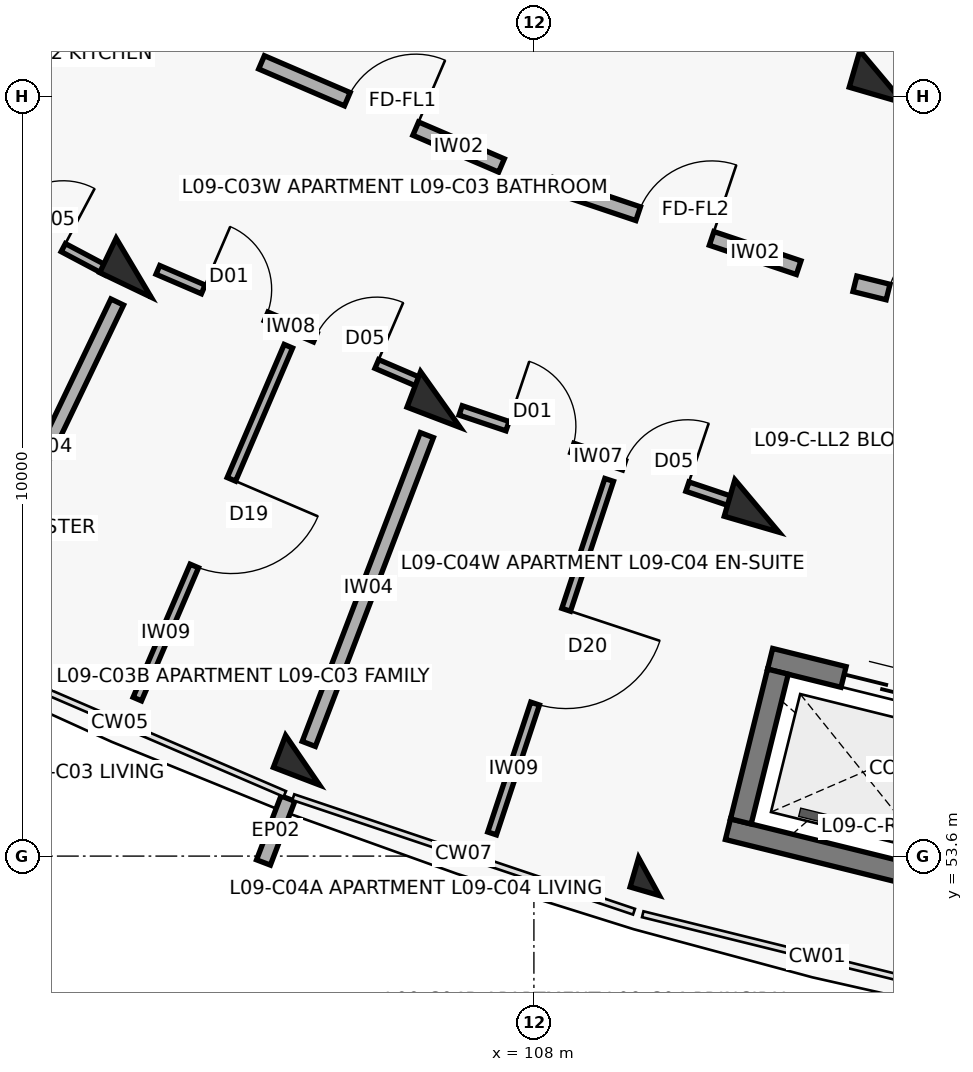
"""IFC4 building model, lengths in metres.
Left out: names, types, materials, properties, quantities, classifications, styles, units other than length and angle.
Written with IfcOpenShell. Run it as: python <this file> out.ifc"""

import sys

from ifc_helpers import new_model, si_unit, direction, frame, frame_2d, origin, origin_2d, place, context, subcontext, project, spatial, rectangle, extrude, element, fill, save


model = new_model("IFC4")
c1 = context("Model", 3, precision=1e-05, world=origin(), true_north=direction((0.0, 1.0)))
c2 = subcontext(c1, "Body", "Model", "MODEL_VIEW")
j1 = project(units=[si_unit("LENGTHUNIT", "METRE"), si_unit("PLANEANGLEUNIT", "RADIAN")], contexts=[c1])
p1 = place(None, origin())
s1 = spatial("IfcSite", under=j1, at=p1, CompositionType="ELEMENT")
p2 = place(p1, origin())
s2 = spatial("IfcBuilding", under=s1, at=p2, CompositionType="ELEMENT")
p3 = place(p2, frame((0.0, 0.0, 29.8)))
s3 = spatial("IfcBuildingStorey", under=s2, at=p3, CompositionType="ELEMENT", Elevation=29.8)
for number, where, z_axis, x_axis in (
    (1, (102.734, 61.341, 0.0), (0.0, 0.0, 1.0), (-0.432, -0.902, 0.0)),
    (2, (106.77, 59.606, 0.0), (0.0, 0.0, 1.0), (-0.357, -0.934, 0.0)),
):
    element("IfcColumn", number, at=place(p3, frame(where, z_axis=z_axis, x_axis=x_axis)), inside=s3, PredefinedType="COLUMN", context=c2, shape_type="SweptSolid", body=[
        extrude(rectangle(XDim=0.5, YDim=0.75, at=origin_2d()), origin(), (0.0, 0.0, 1.0), 3.1),
    ])
p4 = place(p3, frame((104.956, 54.861, 0.0), z_axis=(0.0, 0.0, 1.0), x_axis=(-0.357064076459, -0.934079892355, 0.0)))
e3 = element("IfcColumn", 3, at=p4, inside=s3, PredefinedType="COLUMN", context=c2, shape_type="SweptSolid", body=[
    extrude(rectangle(XDim=0.45, YDim=0.65, at=origin_2d()), origin(), (0.0, 0.0, 1.0), 3.1),
])
for number, where, z_axis, x_axis in (
    (4, (112.579, 63.852, 0.0), (0.0, 0.0, 1.0), (-0.28, -0.96, 0.0)),
    (5, (110.934, 58.207, 0.0), (0.0, 0.0, 1.0), (-0.28, -0.96, 0.0)),
):
    element("IfcColumn", number, at=place(p3, frame(where, z_axis=z_axis, x_axis=x_axis)), inside=s3, PredefinedType="COLUMN", context=c2, shape_type="SweptSolid", body=[
        extrude(rectangle(XDim=0.5, YDim=0.75, at=origin_2d()), origin(), (0.0, 0.0, 1.0), 3.1),
    ])
p5 = place(p3, frame((109.513, 53.329, 0.0), z_axis=(0.0, 0.0, 1.0), x_axis=(-0.27966144946, -0.96009867914, 0.0)))
e6 = element("IfcColumn", 6, at=p5, inside=s3, PredefinedType="COLUMN", context=c2, shape_type="SweptSolid", body=[
    extrude(rectangle(XDim=0.4, YDim=0.4, at=origin_2d()), origin(), (0.0, 0.0, 1.0), 3.1),
])
p6 = place(p3, frame((104.763, 54.357, 0.0), z_axis=(0.0, 0.0, 1.0), x_axis=(-0.357033038474, -0.934091756434, 0.0)))
e7 = element("IfcWall", 7, at=p6, inside=s3, PredefinedType="PARAPET", context=c2, shape_type="SweptSolid", body=[
    extrude(rectangle(XDim=0.9, YDim=0.195, at=frame_2d((0.45, 0.0))), origin(), (0.0, 0.0, 1.0), 2.25),
])
p7 = place(p3, frame((111.108, 56.196, 0.0), z_axis=(0.0, 0.0, 1.0), x_axis=(0.970706856107, -0.240266933861, 0.0)))
e8 = element("IfcWall", 8, at=p7, inside=s3, PredefinedType="SHEAR", context=c2, shape_type="SweptSolid", body=[
    extrude(rectangle(XDim=3.09, YDim=0.28, at=frame_2d((1.545, 0.0))), origin(), (0.0, 0.0, 1.0), 3.1),
])
p8 = place(p7, frame((0.995, 0.0, 0.0)))
e9 = element("IfcOpeningElement", 9, at=p8, cuts=e8, PredefinedType="OPENING", context=c2, shape_type="SweptSolid", body=[
    extrude(rectangle(XDim=1.1, YDim=2.15, at=frame_2d((0.55, 1.075))), frame((0.0, 0.15, 0.0), z_axis=(0.0, -1.0, 0.0), x_axis=(1.0, 0.0, 0.0)), (0.0, 0.0, 1.0), 0.3),
])
p9 = place(p3, frame((110.553, 53.954, 0.0), z_axis=(0.0, 0.0, 1.0), x_axis=(0.970725280816, -0.240192483614, 0.0)))
e10 = element("IfcWall", 10, at=p9, inside=s3, PredefinedType="SHEAR", context=c2, shape_type="SweptSolid", body=[
    extrude(rectangle(XDim=3.09, YDim=0.28, at=frame_2d((1.545, 0.0))), origin(), (0.0, 0.0, 1.0), 3.1),
])
p10 = place(p3, frame((111.21, 56.027, 0.0), z_axis=(0.0, 0.0, 1.0), x_axis=(-0.240186044774, -0.970726873995, 0.0)))
e11 = element("IfcWall", 11, at=p10, inside=s3, PredefinedType="SHEAR", context=c2, shape_type="SweptSolid", body=[
    extrude(rectangle(XDim=2.03, YDim=0.28, at=frame_2d((1.015, 0.0))), origin(), (0.0, 0.0, 1.0), 3.1),
])
p11 = place(p3, frame((99.017, 63.087, 0.0), z_axis=(0.0, 0.0, 1.0), x_axis=(0.883415075746, -0.468591297342, 0.0)))
e12 = element("IfcWall", 12, at=p11, inside=s3, PredefinedType="PARTITIONING", context=c2, shape_type="SweptSolid", body=[
    extrude(rectangle(XDim=3.81, YDim=0.12, at=frame_2d((1.905, 0.0))), origin(), (0.0, 0.0, 1.0), 2.14),
])
p12 = place(p11, frame((0.65, 0.0, 0.0)))
e13 = element("IfcOpeningElement", 13, at=p12, cuts=e12, PredefinedType="OPENING", context=c2, shape_type="SweptSolid", body=[
    extrude(rectangle(XDim=0.9, YDim=2.1, at=frame_2d((0.45, 1.05))), frame((0.0, 0.07, 0.0), z_axis=(0.0, -1.0, 0.0), x_axis=(1.0, 0.0, 0.0)), (0.0, 0.0, 1.0), 0.14),
])
p13 = place(p11, frame((2.28, 0.0, 0.0)))
e14 = element("IfcOpeningElement", 14, at=p13, cuts=e12, PredefinedType="OPENING", context=c2, shape_type="SweptSolid", body=[
    extrude(rectangle(XDim=0.88, YDim=2.1, at=frame_2d((0.44, 1.05))), frame((0.0, 0.07, 0.0), z_axis=(0.0, -1.0, 0.0), x_axis=(1.0, 0.0, 0.0)), (0.0, 0.0, 1.0), 0.14),
])
p14 = place(p3, frame((104.417, 64.044, 0.0), z_axis=(0.0, 0.0, 1.0), x_axis=(0.918718172399, -0.394913813008, 0.0)))
e15 = element("IfcWall", 15, at=p14, inside=s3, PredefinedType="SOLIDWALL", context=c2, shape_type="SweptSolid", body=[
    extrude(rectangle(XDim=3.436, YDim=0.19, at=frame_2d((1.718, 0.0))), origin(), (0.0, 0.0, 1.0), 2.14),
])
p15 = place(p14, frame((1.228, 0.0, 0.0)))
e16 = element("IfcOpeningElement", 16, at=p15, cuts=e15, PredefinedType="OPENING", context=c2, shape_type="SweptSolid", body=[
    extrude(rectangle(XDim=0.98, YDim=2.15, at=frame_2d((0.49, 1.075))), frame((0.0, 0.105, 0.0), z_axis=(0.0, -1.0, 0.0), x_axis=(1.0, 0.0, 0.0)), (0.0, 0.0, 1.0), 0.21),
])
p16 = place(p3, frame((103.052, 61.313, 0.0), z_axis=(0.0, 0.0, 1.0), x_axis=(0.918714121981, -0.39492323567, 0.0)))
e17 = element("IfcWall", 17, at=p16, inside=s3, PredefinedType="PARTITIONING", context=c2, shape_type="SweptSolid", body=[
    extrude(rectangle(XDim=3.785, YDim=0.125, at=frame_2d((1.893, 0.0))), origin(), (0.0, 0.0, 1.0), 2.14),
])
p17 = place(p16, frame((0.65, 0.0, 0.0)))
e18 = element("IfcOpeningElement", 18, at=p17, cuts=e17, PredefinedType="OPENING", context=c2, shape_type="SweptSolid", body=[
    extrude(rectangle(XDim=0.9, YDim=2.1, at=frame_2d((0.45, 1.05))), frame((0.0, 0.073, 0.0), z_axis=(0.0, -1.0, 0.0), x_axis=(1.0, 0.0, 0.0)), (0.0, 0.0, 1.0), 0.145),
])
p18 = place(p16, frame((2.255, 0.0, 0.0)))
e19 = element("IfcOpeningElement", 19, at=p18, cuts=e17, PredefinedType="OPENING", context=c2, shape_type="SweptSolid", body=[
    extrude(rectangle(XDim=0.88, YDim=2.1, at=frame_2d((0.44, 1.05))), frame((0.0, 0.073, 0.0), z_axis=(0.0, -1.0, 0.0), x_axis=(1.0, 0.0, 0.0)), (0.0, 0.0, 1.0), 0.145),
])
p19 = place(p3, frame((104.769, 60.309, 0.0), z_axis=(0.0, 0.0, 1.0), x_axis=(-0.393522505308, -0.919314982917, 0.0)))
e20 = element("IfcWall", 20, at=p19, inside=s3, PredefinedType="PARTITIONING", context=c2, shape_type="SweptSolid", body=[
    extrude(rectangle(XDim=5.05, YDim=0.12, at=frame_2d((2.525, 0.0))), origin(), (0.0, 0.0, 1.0), 2.14),
])
p20 = place(p19, frame((1.905, 0.0, 0.0)))
e21 = element("IfcOpeningElement", 21, at=p20, cuts=e20, PredefinedType="OPENING", context=c2, shape_type="SweptSolid", body=[
    extrude(rectangle(XDim=1.24, YDim=2.1, at=frame_2d((0.62, 1.05))), frame((0.0, 0.07, 0.0), z_axis=(0.0, -1.0, 0.0), x_axis=(1.0, 0.0, 0.0)), (0.0, 0.0, 1.0), 0.14),
])
p21 = place(p3, frame((102.518, 60.89, 0.0), z_axis=(0.0, 0.0, 1.0), x_axis=(-0.432108769108, -0.901821496561, 0.0)))
e22 = element("IfcWall", 22, at=p21, inside=s3, PredefinedType="SOLIDWALL", context=c2, shape_type="SweptSolid", body=[
    extrude(rectangle(XDim=4.35, YDim=0.185, at=frame_2d((2.175, 0.0))), origin(), (0.0, 0.0, 1.0), 2.14),
])
p22 = place(p3, frame((108.227, 62.437, 0.0), z_axis=(0.0, 0.0, 1.0), x_axis=(0.947884468821, -0.318614239745, 0.0)))
e23 = element("IfcWall", 23, at=p22, inside=s3, PredefinedType="SOLIDWALL", context=c2, shape_type="SweptSolid", body=[
    extrude(rectangle(XDim=3.436, YDim=0.19, at=frame_2d((1.718, 0.0))), origin(), (0.0, 0.0, 1.0), 2.14),
])
p23 = place(p22, frame((1.208, 0.0, 0.0)))
e24 = element("IfcOpeningElement", 24, at=p23, cuts=e23, PredefinedType="OPENING", context=c2, shape_type="SweptSolid", body=[
    extrude(rectangle(XDim=1.02, YDim=2.15, at=frame_2d((0.51, 1.075))), frame((0.0, 0.105, 0.0), z_axis=(0.0, -1.0, 0.0), x_axis=(1.0, 0.0, 0.0)), (0.0, 0.0, 1.0), 0.21),
])
p24 = place(p3, frame((107.036, 59.464, 0.0), z_axis=(0.0, 0.0, 1.0), x_axis=(0.947883094845, -0.318618327323, 0.0)))
e25 = element("IfcWall", 25, at=p24, inside=s3, PredefinedType="PARTITIONING", context=c2, shape_type="SweptSolid", body=[
    extrude(rectangle(XDim=3.798, YDim=0.13, at=frame_2d((1.899, 0.0))), origin(), (0.0, 0.0, 1.0), 2.14),
])
p25 = place(p24, frame((0.65, 0.0, 0.0)))
e26 = element("IfcOpeningElement", 26, at=p25, cuts=e25, PredefinedType="OPENING", context=c2, shape_type="SweptSolid", body=[
    extrude(rectangle(XDim=0.9, YDim=2.1, at=frame_2d((0.45, 1.05))), frame((0.0, 0.075, 0.0), z_axis=(0.0, -1.0, 0.0), x_axis=(1.0, 0.0, 0.0)), (0.0, 0.0, 1.0), 0.15),
])
p26 = place(p24, frame((2.267, 0.0, 0.0)))
e27 = element("IfcOpeningElement", 27, at=p26, cuts=e25, PredefinedType="OPENING", context=c2, shape_type="SweptSolid", body=[
    extrude(rectangle(XDim=0.88, YDim=2.1, at=frame_2d((0.44, 1.05))), frame((0.0, 0.075, 0.0), z_axis=(0.0, -1.0, 0.0), x_axis=(1.0, 0.0, 0.0)), (0.0, 0.0, 1.0), 0.15),
])
p27 = place(p3, frame((108.99, 58.55, 0.0), z_axis=(0.0, 0.0, 1.0), x_axis=(-0.314343770763, -0.949309219266, 0.0)))
e28 = element("IfcWall", 28, at=p27, inside=s3, PredefinedType="PARTITIONING", context=c2, shape_type="SweptSolid", body=[
    extrude(rectangle(XDim=4.9, YDim=0.12, at=frame_2d((2.45, 0.0))), origin(), (0.0, 0.0, 1.0), 2.14),
])
p28 = place(p27, frame((1.8, 0.0, 0.0)))
e29 = element("IfcOpeningElement", 29, at=p28, cuts=e28, PredefinedType="OPENING", context=c2, shape_type="SweptSolid", body=[
    extrude(rectangle(XDim=1.3, YDim=2.1, at=frame_2d((0.65, 1.05))), frame((0.0, 0.07, 0.0), z_axis=(0.0, -1.0, 0.0), x_axis=(1.0, 0.0, 0.0)), (0.0, 0.0, 1.0), 0.14),
])
p29 = place(p3, frame((106.591, 59.139, 0.0), z_axis=(0.0, 0.0, 1.0), x_axis=(-0.357064016205, -0.934079915388, 0.0)))
e30 = element("IfcWall", 30, at=p29, inside=s3, PredefinedType="SOLIDWALL", context=c2, shape_type="SweptSolid", body=[
    extrude(rectangle(XDim=4.35, YDim=0.185, at=frame_2d((2.175, 0.0))), origin(), (0.0, 0.0, 1.0), 2.14),
])
p30 = place(p3, frame((112.223, 61.13, 0.0), z_axis=(0.0, 0.0, 1.0), x_axis=(0.970719238682, -0.240216901263, 0.0)))
e31 = element("IfcWall", 31, at=p30, inside=s3, PredefinedType="SOLIDWALL", context=c2, shape_type="SweptSolid", body=[
    extrude(rectangle(XDim=3.296, YDim=0.21, at=frame_2d((1.648, 0.0))), origin(), (0.0, 0.0, 1.0), 2.14),
])
p31 = place(p30, frame((0.45, 0.0, 0.0)))
e32 = element("IfcOpeningElement", 32, at=p31, cuts=e31, PredefinedType="OPENING", context=c2, shape_type="SweptSolid", body=[
    extrude(rectangle(XDim=1.1, YDim=2.15, at=frame_2d((0.55, 1.075))), frame((0.0, 0.115, 0.0), z_axis=(0.0, -1.0, 0.0), x_axis=(1.0, 0.0, 0.0)), (0.0, 0.0, 1.0), 0.23),
])
p32 = place(p30, frame((1.726, 0.0, 0.0)))
e33 = element("IfcOpeningElement", 33, at=p32, cuts=e31, PredefinedType="OPENING", context=c2, shape_type="SweptSolid", body=[
    extrude(rectangle(XDim=1.12, YDim=2.15, at=frame_2d((0.56, 1.075))), frame((0.0, 0.115, 0.0), z_axis=(0.0, -1.0, 0.0), x_axis=(1.0, 0.0, 0.0)), (0.0, 0.0, 1.0), 0.23),
])
p33 = place(p8, origin())
e34 = element("IfcDoor", 34, at=p33, inside=s3, OperationType="DOUBLE_DOOR_SLIDING", PredefinedType="DOOR", context=c2, shape_type="SweptSolid", body=[
    extrude(rectangle(XDim=1.1, YDim=2.15, at=frame_2d((0.55, 1.075))), frame((0.0, 0.025, 0.0), z_axis=(0.0, -1.0, 0.0), x_axis=(1.0, 0.0, 0.0)), (0.0, 0.0, 1.0), 0.05),
])
fill(e9, e34)
p34 = place(p13, origin())
e35 = element("IfcDoor", 35, at=p34, inside=s3, OperationType="SINGLE_SWING_RIGHT", PredefinedType="DOOR", context=c2, shape_type="SweptSolid", body=[
    extrude(rectangle(XDim=0.88, YDim=2.1, at=frame_2d((0.44, 1.05))), frame((0.0, 0.025, 0.0), z_axis=(0.0, -1.0, 0.0), x_axis=(1.0, 0.0, 0.0)), (0.0, 0.0, 1.0), 0.05),
])
fill(e14, e35)
p35 = place(p15, origin())
e36 = element("IfcDoor", 36, at=p35, inside=s3, OperationType="SINGLE_SWING_RIGHT", PredefinedType="DOOR", context=c2, shape_type="SweptSolid", body=[
    extrude(rectangle(XDim=0.98, YDim=2.15, at=frame_2d((0.49, 1.075))), frame((0.0, 0.025, 0.0), z_axis=(0.0, -1.0, 0.0), x_axis=(1.0, 0.0, 0.0)), (0.0, 0.0, 1.0), 0.05),
])
fill(e16, e36)
p36 = place(p17, origin())
e37 = element("IfcDoor", 37, at=p36, inside=s3, OperationType="SINGLE_SWING_LEFT", PredefinedType="DOOR", context=c2, shape_type="SweptSolid", body=[
    extrude(rectangle(XDim=0.9, YDim=2.1, at=frame_2d((0.45, 1.05))), frame((0.0, 0.025, 0.0), z_axis=(0.0, -1.0, 0.0), x_axis=(1.0, 0.0, 0.0)), (0.0, 0.0, 1.0), 0.05),
])
fill(e18, e37)
p37 = place(p18, origin())
e38 = element("IfcDoor", 38, at=p37, inside=s3, OperationType="SINGLE_SWING_RIGHT", PredefinedType="DOOR", context=c2, shape_type="SweptSolid", body=[
    extrude(rectangle(XDim=0.88, YDim=2.1, at=frame_2d((0.44, 1.05))), frame((0.0, 0.025, 0.0), z_axis=(0.0, -1.0, 0.0), x_axis=(1.0, 0.0, 0.0)), (0.0, 0.0, 1.0), 0.05),
])
fill(e19, e38)
p38 = place(p20, origin())
e39 = element("IfcDoor", 39, at=p38, inside=s3, OperationType="SINGLE_SWING_LEFT", PredefinedType="DOOR", context=c2, shape_type="SweptSolid", body=[
    extrude(rectangle(XDim=1.24, YDim=2.1, at=frame_2d((0.62, 1.05))), frame((0.0, 0.025, 0.0), z_axis=(0.0, -1.0, 0.0), x_axis=(1.0, 0.0, 0.0)), (0.0, 0.0, 1.0), 0.05),
])
fill(e21, e39)
p39 = place(p23, origin())
e40 = element("IfcDoor", 40, at=p39, inside=s3, OperationType="SINGLE_SWING_RIGHT", PredefinedType="DOOR", context=c2, shape_type="SweptSolid", body=[
    extrude(rectangle(XDim=1.02, YDim=2.15, at=frame_2d((0.51, 1.075))), frame((0.0, 0.025, 0.0), z_axis=(0.0, -1.0, 0.0), x_axis=(1.0, 0.0, 0.0)), (0.0, 0.0, 1.0), 0.05),
])
fill(e24, e40)
p40 = place(p25, origin())
e41 = element("IfcDoor", 41, at=p40, inside=s3, OperationType="SINGLE_SWING_LEFT", PredefinedType="DOOR", context=c2, shape_type="SweptSolid", body=[
    extrude(rectangle(XDim=0.9, YDim=2.1, at=frame_2d((0.45, 1.05))), frame((0.0, 0.025, 0.0), z_axis=(0.0, -1.0, 0.0), x_axis=(1.0, 0.0, 0.0)), (0.0, 0.0, 1.0), 0.05),
])
fill(e26, e41)
p41 = place(p26, origin())
e42 = element("IfcDoor", 42, at=p41, inside=s3, OperationType="SINGLE_SWING_RIGHT", PredefinedType="DOOR", context=c2, shape_type="SweptSolid", body=[
    extrude(rectangle(XDim=0.88, YDim=2.1, at=frame_2d((0.44, 1.05))), frame((0.0, 0.025, 0.0), z_axis=(0.0, -1.0, 0.0), x_axis=(1.0, 0.0, 0.0)), (0.0, 0.0, 1.0), 0.05),
])
fill(e27, e42)
p42 = place(p28, origin())
e43 = element("IfcDoor", 43, at=p42, inside=s3, OperationType="SINGLE_SWING_LEFT", PredefinedType="DOOR", context=c2, shape_type="SweptSolid", body=[
    extrude(rectangle(XDim=1.3, YDim=2.1, at=frame_2d((0.65, 1.05))), frame((0.0, 0.025, 0.0), z_axis=(0.0, -1.0, 0.0), x_axis=(1.0, 0.0, 0.0)), (0.0, 0.0, 1.0), 0.05),
])
fill(e29, e43)
p43 = place(p31, origin())
e44 = element("IfcDoor", 44, at=p43, inside=s3, OperationType="SINGLE_SWING_RIGHT", PredefinedType="DOOR", context=c2, shape_type="SweptSolid", body=[
    extrude(rectangle(XDim=1.1, YDim=2.15, at=frame_2d((0.55, 1.075))), frame((0.0, 0.025, 0.0), z_axis=(0.0, -1.0, 0.0), x_axis=(1.0, 0.0, 0.0)), (0.0, 0.0, 1.0), 0.05),
])
fill(e32, e44)
save(model, sys.argv[1])
